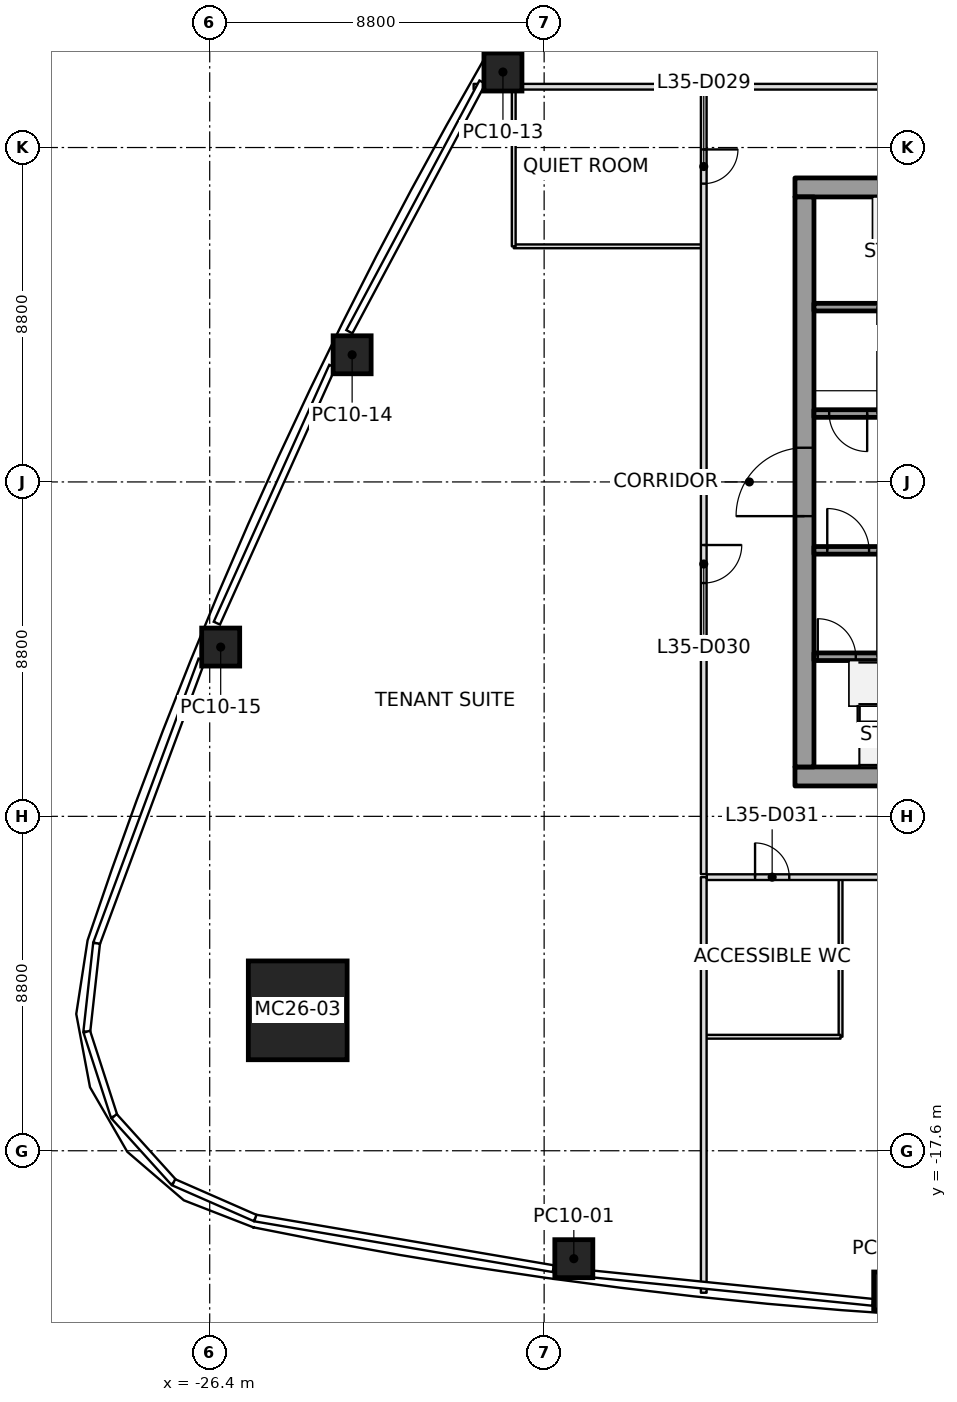
"""IFC4 building model, lengths in metres.
Left out: names, types, materials, properties, quantities, classifications, styles, units other than length and angle.
Written with IfcOpenShell. Run it as: python <this file> out.ifc"""

import sys

from ifc_helpers import new_model, si_unit, direction, frame, frame_2d, origin, origin_2d, place, context, subcontext, project, spatial, rectangle, extrude, element, fill, save


model = new_model("IFC4")
c1 = context("Model", 3, precision=1e-05, world=origin(), true_north=direction((0.0, 1.0)))
c2 = subcontext(c1, "Body", "Model", "MODEL_VIEW")
j1 = project(units=[si_unit("LENGTHUNIT", "METRE"), si_unit("PLANEANGLEUNIT", "RADIAN")], contexts=[c1])
p1 = place(None, origin())
s1 = spatial("IfcSite", under=j1, at=p1, CompositionType="ELEMENT")
p2 = place(p1, origin())
s2 = spatial("IfcBuilding", under=s1, at=p2, CompositionType="ELEMENT")
p3 = place(p2, frame((0.0, 0.0, 161.8)))
s3 = spatial("IfcBuildingStorey", under=s2, at=p3, CompositionType="ELEMENT", Elevation=161.8)
p4 = place(p3, frame((-24.084, -13.905, 0.0), z_axis=(0.028000489904, 0.016165860184, 0.999477182096), x_axis=(0.999607909415, -0.000452829555, -0.027996828039)))
e1 = element("IfcColumn", 1, at=p4, inside=s3, PredefinedType="COLUMN", context=c2, shape_type="SweptSolid", body=[
    extrude(rectangle(XDim=2.6, YDim=2.6, at=origin_2d()), origin(), (0.0, 0.0, 1.0), 4.002),
])
p5 = place(p3, frame((-16.819, -20.44, 0.0), z_axis=(0.017635456472, 0.010434820265, 0.999790030557), x_axis=(-0.990791167808, 0.134441446562, 0.016073557137)))
e2 = element("IfcColumn", 2, at=p5, inside=s3, PredefinedType="COLUMN", context=c2, shape_type="SweptSolid", body=[
    extrude(rectangle(XDim=1.0, YDim=1.0, at=origin_2d()), origin(), (0.0, 0.0, 1.0), 4.001),
])
p6 = place(p3, frame((-8.428, -21.29, 0.0), z_axis=(0.008849199152, 0.01116829962, 0.999898475225), x_axis=(-0.997694684964, 0.06738008669, 0.008077097989)))
e3 = element("IfcColumn", 3, at=p6, inside=s3, PredefinedType="COLUMN", context=c2, shape_type="SweptSolid", body=[
    extrude(rectangle(XDim=1.0, YDim=1.0, at=origin_2d()), origin(), (0.0, 0.0, 1.0), 4.0),
])
p7 = place(p3, frame((-18.684, 10.787, 0.0), z_axis=(0.009887052741, -0.005675900648, 0.999935013058), x_axis=(0.49997556095, 0.866039512773, -2.7732311e-05)))
e4 = element("IfcColumn", 4, at=p7, inside=s3, PredefinedType="COLUMN", context=c2, shape_type="SweptSolid", body=[
    extrude(rectangle(XDim=1.0, YDim=1.0, at=origin_2d()), origin(), (0.0, 0.0, 1.0), 4.0),
])
p8 = place(p3, frame((-22.652, 3.346, 0.0), z_axis=(0.014097689605, 0.002074984617, 0.999898469639), x_axis=(0.440551988154, 0.897690788492, -0.008074279545)))
e5 = element("IfcColumn", 5, at=p8, inside=s3, PredefinedType="COLUMN", context=c2, shape_type="SweptSolid", body=[
    extrude(rectangle(XDim=1.0, YDim=1.0, at=origin_2d()), origin(), (0.0, 0.0, 1.0), 4.0),
])
p9 = place(p3, frame((-26.111, -4.345, 0.0), z_axis=(0.017879535448, 0.010068680372, 0.999789449778), x_axis=(0.379133932598, 0.925201775595, -0.016097688918)))
e6 = element("IfcColumn", 6, at=p9, inside=s3, PredefinedType="COLUMN", context=c2, shape_type="SweptSolid", body=[
    extrude(rectangle(XDim=1.0, YDim=1.0, at=origin_2d()), origin(), (0.0, 0.0, 1.0), 4.001),
])
p10 = place(p3, frame((-11.0, -7.75, 0.0), z_axis=(0.0, 0.0, 1.0), x_axis=(1.0, 0.0, 0.0)))
e7 = element("IfcWall", 7, at=p10, inside=s3, PredefinedType="SHEAR", context=c2, shape_type="SweptSolid", body=[
    extrude(rectangle(XDim=22.0, YDim=0.5, at=frame_2d((11.0, 0.0))), origin(), (0.0, 0.0, 1.0), 4.0),
])
p11 = place(p10, frame((10.45, 0.0, 0.0)))
e8 = element("IfcOpeningElement", 8, at=p11, cuts=e7, PredefinedType="OPENING", context=c2, shape_type="SweptSolid", body=[
    extrude(rectangle(XDim=1.1, YDim=2.1, at=frame_2d((0.55, 1.05))), frame((0.0, 0.25, 0.0), z_axis=(0.0, -1.0, 0.0), x_axis=(1.0, 0.0, 0.0)), (0.0, 0.0, 1.0), 0.5),
])
p12 = place(p3, frame((-11.0, 7.75, 0.0), z_axis=(0.0, 0.0, 1.0), x_axis=(1.0, 0.0, 0.0)))
e9 = element("IfcWall", 9, at=p12, inside=s3, PredefinedType="SHEAR", context=c2, shape_type="SweptSolid", body=[
    extrude(rectangle(XDim=22.0, YDim=0.5, at=frame_2d((11.0, 0.0))), origin(), (0.0, 0.0, 1.0), 4.0),
])
p13 = place(p12, frame((10.45, 0.0, 0.0)))
e10 = element("IfcOpeningElement", 10, at=p13, cuts=e9, PredefinedType="OPENING", context=c2, shape_type="SweptSolid", body=[
    extrude(rectangle(XDim=1.1, YDim=2.1, at=frame_2d((0.55, 1.05))), frame((0.0, 0.25, 0.0), z_axis=(0.0, -1.0, 0.0), x_axis=(1.0, 0.0, 0.0)), (0.0, 0.0, 1.0), 0.5),
])
p14 = place(p3, frame((-10.75, -7.5, 0.0), z_axis=(0.0, 0.0, 1.0), x_axis=(0.0, 1.0, 0.0)))
e11 = element("IfcWall", 11, at=p14, inside=s3, PredefinedType="SHEAR", context=c2, shape_type="SweptSolid", body=[
    extrude(rectangle(XDim=15.0, YDim=0.5, at=frame_2d((7.5, 0.0))), origin(), (0.0, 0.0, 1.0), 4.0),
])
p15 = place(p14, frame((6.6, 0.0, 0.0)))
e12 = element("IfcOpeningElement", 12, at=p15, cuts=e11, PredefinedType="OPENING", context=c2, shape_type="SweptSolid", body=[
    extrude(rectangle(XDim=1.8, YDim=2.1, at=frame_2d((0.9, 1.05))), frame((0.0, 0.25, 0.0), z_axis=(0.0, -1.0, 0.0), x_axis=(1.0, 0.0, 0.0)), (0.0, 0.0, 1.0), 0.5),
])
p16 = place(p3, frame((-10.5, -4.6, 0.0), z_axis=(0.0, 0.0, 1.0), x_axis=(1.0, 0.0, 0.0)))
e13 = element("IfcWall", 13, at=p16, inside=s3, PredefinedType="SOLIDWALL", context=c2, shape_type="SweptSolid", body=[
    extrude(rectangle(XDim=1.8, YDim=0.2, at=frame_2d((0.9, 0.0))), origin(), (0.0, 0.0, 1.0), 3.85),
])
p17 = place(p16, frame((0.1, 0.0, 0.0)))
e14 = element("IfcOpeningElement", 14, at=p17, cuts=e13, PredefinedType="OPENING", context=c2, shape_type="SweptSolid", body=[
    extrude(rectangle(XDim=1.0, YDim=2.1, at=frame_2d((0.5, 1.05))), frame((0.0, 0.1, 0.0), z_axis=(0.0, -1.0, 0.0), x_axis=(1.0, 0.0, 0.0)), (0.0, 0.0, 1.0), 0.2),
])
p18 = place(p3, frame((-10.5, -1.8, 0.0), z_axis=(0.0, 0.0, 1.0), x_axis=(1.0, 0.0, 0.0)))
e15 = element("IfcWall", 15, at=p18, inside=s3, PredefinedType="SOLIDWALL", context=c2, shape_type="SweptSolid", body=[
    extrude(rectangle(XDim=1.8, YDim=0.2, at=frame_2d((0.9, 0.0))), origin(), (0.0, 0.0, 1.0), 3.85),
])
p19 = place(p18, frame((0.35, 0.0, 0.0)))
e16 = element("IfcOpeningElement", 16, at=p19, cuts=e15, PredefinedType="OPENING", context=c2, shape_type="SweptSolid", body=[
    extrude(rectangle(XDim=1.1, YDim=2.1, at=frame_2d((0.55, 1.05))), frame((0.0, 0.1, 0.0), z_axis=(0.0, -1.0, 0.0), x_axis=(1.0, 0.0, 0.0)), (0.0, 0.0, 1.0), 0.2),
])
p20 = place(p3, frame((-8.7, 1.8, 0.0), z_axis=(0.0, 0.0, 1.0), x_axis=(-1.0, 0.0, 0.0)))
e17 = element("IfcWall", 17, at=p20, inside=s3, PredefinedType="SOLIDWALL", context=c2, shape_type="SweptSolid", body=[
    extrude(rectangle(XDim=1.8, YDim=0.2, at=frame_2d((0.9, 0.0))), origin(), (0.0, 0.0, 1.0), 3.85),
])
p21 = place(p20, frame((0.4, 0.0, 0.0)))
e18 = element("IfcOpeningElement", 18, at=p21, cuts=e17, PredefinedType="OPENING", context=c2, shape_type="SweptSolid", body=[
    extrude(rectangle(XDim=1.0, YDim=2.1, at=frame_2d((0.5, 1.05))), frame((0.0, 0.1, 0.0), z_axis=(0.0, -1.0, 0.0), x_axis=(1.0, 0.0, 0.0)), (0.0, 0.0, 1.0), 0.2),
])
p22 = place(p3, frame((-8.7, 4.6, 0.0), z_axis=(0.0, 0.0, 1.0), x_axis=(-1.0, 0.0, 0.0)))
e19 = element("IfcWall", 19, at=p22, inside=s3, PredefinedType="SOLIDWALL", context=c2, shape_type="SweptSolid", body=[
    extrude(rectangle(XDim=1.8, YDim=0.2, at=frame_2d((0.9, 0.0))), origin(), (0.0, 0.0, 1.0), 3.85),
])
p23 = place(p3, frame((-13.4, 10.4, 0.0), z_axis=(0.0, 0.0, 1.0), x_axis=(-1.0, 0.0, 0.0)))
e20 = element("IfcWall", 20, at=p23, inside=s3, PredefinedType="PARTITIONING", context=c2, shape_type="SweptSolid", body=[
    extrude(rectangle(XDim=6.055, YDim=0.15, at=frame_2d((3.028, 0.0))), origin(), (0.0, 0.0, 1.0), 3.234),
])
p24 = place(p3, frame((-13.4, -10.4, 0.0), z_axis=(0.0, 0.0, 1.0), x_axis=(0.0, -1.0, 0.0)))
e21 = element("IfcWall", 21, at=p24, inside=s3, PredefinedType="PARTITIONING", context=c2, shape_type="SweptSolid", body=[
    extrude(rectangle(XDim=10.937, YDim=0.15, at=frame_2d((5.468, 0.0))), origin(), (0.0, 0.0, 1.0), 3.234),
])
p25 = place(p3, frame((-13.4, 10.32, 0.0), z_axis=(0.0, 0.0, 1.0), x_axis=(0.0, -1.0, 0.0)))
e22 = element("IfcWall", 22, at=p25, inside=s3, PredefinedType="PARTITIONING", context=c2, shape_type="SweptSolid", body=[
    extrude(rectangle(XDim=20.64, YDim=0.15, at=frame_2d((10.32, 0.0))), origin(), (0.0, 0.0, 1.0), 3.166),
])
p26 = place(p25, frame((1.57, 0.0, 0.0)))
e23 = element("IfcOpeningElement", 23, at=p26, cuts=e22, PredefinedType="OPENING", context=c2, shape_type="SweptSolid", body=[
    extrude(rectangle(XDim=0.9, YDim=2.1, at=frame_2d((0.45, 1.05))), frame((0.0, 0.075, 0.0), z_axis=(0.0, -1.0, 0.0), x_axis=(1.0, 0.0, 0.0)), (0.0, 0.0, 1.0), 0.15),
])
p27 = place(p25, frame((11.98, 0.0, 0.0)))
e24 = element("IfcOpeningElement", 24, at=p27, cuts=e22, PredefinedType="OPENING", context=c2, shape_type="SweptSolid", body=[
    extrude(rectangle(XDim=1.0, YDim=2.1, at=frame_2d((0.5, 1.05))), frame((0.0, 0.075, 0.0), z_axis=(0.0, -1.0, 0.0), x_axis=(1.0, 0.0, 0.0)), (0.0, 0.0, 1.0), 0.15),
])
p28 = place(p3, frame((-13.32, -10.4, 0.0), z_axis=(0.0, 0.0, 1.0), x_axis=(1.0, 0.0, 0.0)))
e25 = element("IfcWall", 25, at=p28, inside=s3, PredefinedType="PARTITIONING", context=c2, shape_type="SweptSolid", body=[
    extrude(rectangle(XDim=26.64, YDim=0.15, at=frame_2d((13.32, 0.0))), origin(), (0.0, 0.0, 1.0), 3.317),
])
p29 = place(p28, frame((1.27, 0.0, 0.0)))
e26 = element("IfcOpeningElement", 26, at=p29, cuts=e25, PredefinedType="OPENING", context=c2, shape_type="SweptSolid", body=[
    extrude(rectangle(XDim=0.9, YDim=2.1, at=frame_2d((0.45, 1.05))), frame((0.0, 0.075, 0.0), z_axis=(0.0, -1.0, 0.0), x_axis=(1.0, 0.0, 0.0)), (0.0, 0.0, 1.0), 0.15),
])
p30 = place(p28, frame((9.67, 0.0, 0.0)))
e27 = element("IfcOpeningElement", 27, at=p30, cuts=e25, PredefinedType="OPENING", context=c2, shape_type="SweptSolid", body=[
    extrude(rectangle(XDim=1.0, YDim=2.1, at=frame_2d((0.5, 1.05))), frame((0.0, 0.075, 0.0), z_axis=(0.0, -1.0, 0.0), x_axis=(1.0, 0.0, 0.0)), (0.0, 0.0, 1.0), 0.15),
])
p31 = place(p28, frame((18.77, 0.0, 0.0)))
e28 = element("IfcOpeningElement", 28, at=p31, cuts=e25, PredefinedType="OPENING", context=c2, shape_type="SweptSolid", body=[
    extrude(rectangle(XDim=0.9, YDim=2.1, at=frame_2d((0.45, 1.05))), frame((0.0, 0.075, 0.0), z_axis=(0.0, -1.0, 0.0), x_axis=(1.0, 0.0, 0.0)), (0.0, 0.0, 1.0), 0.15),
])
p32 = place(p28, frame((23.77, 0.0, 0.0)))
e29 = element("IfcOpeningElement", 29, at=p32, cuts=e25, PredefinedType="OPENING", context=c2, shape_type="SweptSolid", body=[
    extrude(rectangle(XDim=1.0, YDim=2.1, at=frame_2d((0.5, 1.05))), frame((0.0, 0.075, 0.0), z_axis=(0.0, -1.0, 0.0), x_axis=(1.0, 0.0, 0.0)), (0.0, 0.0, 1.0), 0.15),
])
p33 = place(p3, frame((13.32, 10.4, 0.0), z_axis=(0.0, 0.0, 1.0), x_axis=(-1.0, 0.0, 0.0)))
e30 = element("IfcWall", 30, at=p33, inside=s3, PredefinedType="PARTITIONING", context=c2, shape_type="SweptSolid", body=[
    extrude(rectangle(XDim=26.64, YDim=0.15, at=frame_2d((13.32, 0.0))), origin(), (0.0, 0.0, 1.0), 3.166),
])
p34 = place(p33, frame((0.95, 0.0, 0.0)))
e31 = element("IfcOpeningElement", 31, at=p34, cuts=e30, PredefinedType="OPENING", context=c2, shape_type="SweptSolid", body=[
    extrude(rectangle(XDim=0.9, YDim=2.1, at=frame_2d((0.45, 1.05))), frame((0.0, 0.075, 0.0), z_axis=(0.0, -1.0, 0.0), x_axis=(1.0, 0.0, 0.0)), (0.0, 0.0, 1.0), 0.15),
])
p35 = place(p33, frame((6.36, 0.0, 0.0)))
e32 = element("IfcOpeningElement", 32, at=p35, cuts=e30, PredefinedType="OPENING", context=c2, shape_type="SweptSolid", body=[
    extrude(rectangle(XDim=1.0, YDim=2.1, at=frame_2d((0.5, 1.05))), frame((0.0, 0.075, 0.0), z_axis=(0.0, -1.0, 0.0), x_axis=(1.0, 0.0, 0.0)), (0.0, 0.0, 1.0), 0.15),
])
p36 = place(p33, frame((12.37, 0.0, 0.0)))
e33 = element("IfcOpeningElement", 33, at=p36, cuts=e30, PredefinedType="OPENING", context=c2, shape_type="SweptSolid", body=[
    extrude(rectangle(XDim=0.9, YDim=2.1, at=frame_2d((0.45, 1.05))), frame((0.0, 0.075, 0.0), z_axis=(0.0, -1.0, 0.0), x_axis=(1.0, 0.0, 0.0)), (0.0, 0.0, 1.0), 0.15),
])
p37 = place(p33, frame((20.38, 0.0, 0.0)))
e34 = element("IfcOpeningElement", 34, at=p37, cuts=e30, PredefinedType="OPENING", context=c2, shape_type="SweptSolid", body=[
    extrude(rectangle(XDim=1.0, YDim=2.1, at=frame_2d((0.5, 1.05))), frame((0.0, 0.075, 0.0), z_axis=(0.0, -1.0, 0.0), x_axis=(1.0, 0.0, 0.0)), (0.0, 0.0, 1.0), 0.15),
])
p38 = place(p3, frame((-13.43, 6.2, 0.0), z_axis=(0.0, 0.0, 1.0), x_axis=(-1.0, 0.0, 0.0)))
e35 = element("IfcWall", 35, at=p38, inside=s3, PredefinedType="PARTITIONING", context=c2, shape_type="SweptSolid", body=[
    extrude(rectangle(XDim=4.97, YDim=0.1, at=frame_2d((2.485, 0.0))), origin(), (0.0, 0.0, 1.0), 3.393),
])
p39 = place(p3, frame((-18.4, 6.2, 0.0), z_axis=(0.0, 0.0, 1.0), x_axis=(0.0, 1.0, 0.0)))
e36 = element("IfcWall", 36, at=p39, inside=s3, PredefinedType="PARTITIONING", context=c2, shape_type="SweptSolid", body=[
    extrude(rectangle(XDim=4.17, YDim=0.1, at=frame_2d((2.085, 0.0))), origin(), (0.0, 0.0, 1.0), 3.393),
])
p40 = place(p3, frame((-9.8, -10.43, 0.0), z_axis=(0.0, 0.0, 1.0), x_axis=(0.0, -1.0, 0.0)))
e37 = element("IfcWall", 37, at=p40, inside=s3, PredefinedType="PARTITIONING", context=c2, shape_type="SweptSolid", body=[
    extrude(rectangle(XDim=4.17, YDim=0.1, at=frame_2d((2.085, 0.0))), origin(), (0.0, 0.0, 1.0), 3.45),
])
p41 = place(p3, frame((-9.8, -14.6, 0.0), z_axis=(0.0, 0.0, 1.0), x_axis=(-1.0, 0.0, 0.0)))
e38 = element("IfcWall", 38, at=p41, inside=s3, PredefinedType="PARTITIONING", context=c2, shape_type="SweptSolid", body=[
    extrude(rectangle(XDim=3.57, YDim=0.1, at=frame_2d((1.785, 0.0))), origin(), (0.0, 0.0, 1.0), 3.393),
])
p42 = place(p26, origin())
e39 = element("IfcDoor", 39, at=p42, inside=s3, OperationType="SINGLE_SWING_LEFT", PredefinedType="DOOR", context=c2, shape_type="SweptSolid", body=[
    extrude(rectangle(XDim=0.9, YDim=2.1, at=frame_2d((0.45, 1.05))), frame((0.0, 0.025, 0.0), z_axis=(0.0, -1.0, 0.0), x_axis=(1.0, 0.0, 0.0)), (0.0, 0.0, 1.0), 0.05),
])
fill(e23, e39)
p43 = place(p27, origin())
e40 = element("IfcDoor", 40, at=p43, inside=s3, OperationType="SINGLE_SWING_LEFT", PredefinedType="DOOR", context=c2, shape_type="SweptSolid", body=[
    extrude(rectangle(XDim=1.0, YDim=2.1, at=frame_2d((0.5, 1.05))), frame((0.0, 0.025, 0.0), z_axis=(0.0, -1.0, 0.0), x_axis=(1.0, 0.0, 0.0)), (0.0, 0.0, 1.0), 0.05),
])
fill(e24, e40)
p44 = place(p29, origin())
e41 = element("IfcDoor", 41, at=p44, inside=s3, OperationType="SINGLE_SWING_LEFT", PredefinedType="DOOR", context=c2, shape_type="SweptSolid", body=[
    extrude(rectangle(XDim=0.9, YDim=2.1, at=frame_2d((0.45, 1.05))), frame((0.0, 0.025, 0.0), z_axis=(0.0, -1.0, 0.0), x_axis=(1.0, 0.0, 0.0)), (0.0, 0.0, 1.0), 0.05),
])
fill(e26, e41)
p45 = place(p19, origin())
e42 = element("IfcDoor", 42, at=p45, inside=s3, OperationType="SINGLE_SWING_RIGHT", PredefinedType="DOOR", context=c2, shape_type="SweptSolid", body=[
    extrude(rectangle(XDim=1.1, YDim=2.1, at=frame_2d((0.55, 1.05))), frame((0.0, 0.025, 0.0), z_axis=(0.0, -1.0, 0.0), x_axis=(1.0, 0.0, 0.0)), (0.0, 0.0, 1.0), 0.05),
])
fill(e16, e42)
p46 = place(p21, origin())
e43 = element("IfcDoor", 43, at=p46, inside=s3, OperationType="SINGLE_SWING_RIGHT", PredefinedType="DOOR", context=c2, shape_type="SweptSolid", body=[
    extrude(rectangle(XDim=1.0, YDim=2.1, at=frame_2d((0.5, 1.05))), frame((0.0, 0.025, 0.0), z_axis=(0.0, -1.0, 0.0), x_axis=(1.0, 0.0, 0.0)), (0.0, 0.0, 1.0), 0.05),
])
fill(e18, e43)
p47 = place(p17, origin())
e44 = element("IfcDoor", 44, at=p47, inside=s3, OperationType="SINGLE_SWING_LEFT", PredefinedType="DOOR", context=c2, shape_type="SweptSolid", body=[
    extrude(rectangle(XDim=1.0, YDim=2.1, at=frame_2d((0.5, 1.05))), frame((0.0, 0.025, 0.0), z_axis=(0.0, -1.0, 0.0), x_axis=(1.0, 0.0, 0.0)), (0.0, 0.0, 1.0), 0.05),
])
fill(e14, e44)
p48 = place(p15, origin())
e45 = element("IfcDoor", 45, at=p48, inside=s3, OperationType="DOUBLE_DOOR_SINGLE_SWING", PredefinedType="DOOR", context=c2, shape_type="SweptSolid", body=[
    extrude(rectangle(XDim=1.8, YDim=2.1, at=frame_2d((0.9, 1.05))), frame((0.0, 0.025, 0.0), z_axis=(0.0, -1.0, 0.0), x_axis=(1.0, 0.0, 0.0)), (0.0, 0.0, 1.0), 0.05),
])
fill(e12, e45)
save(model, sys.argv[1])
